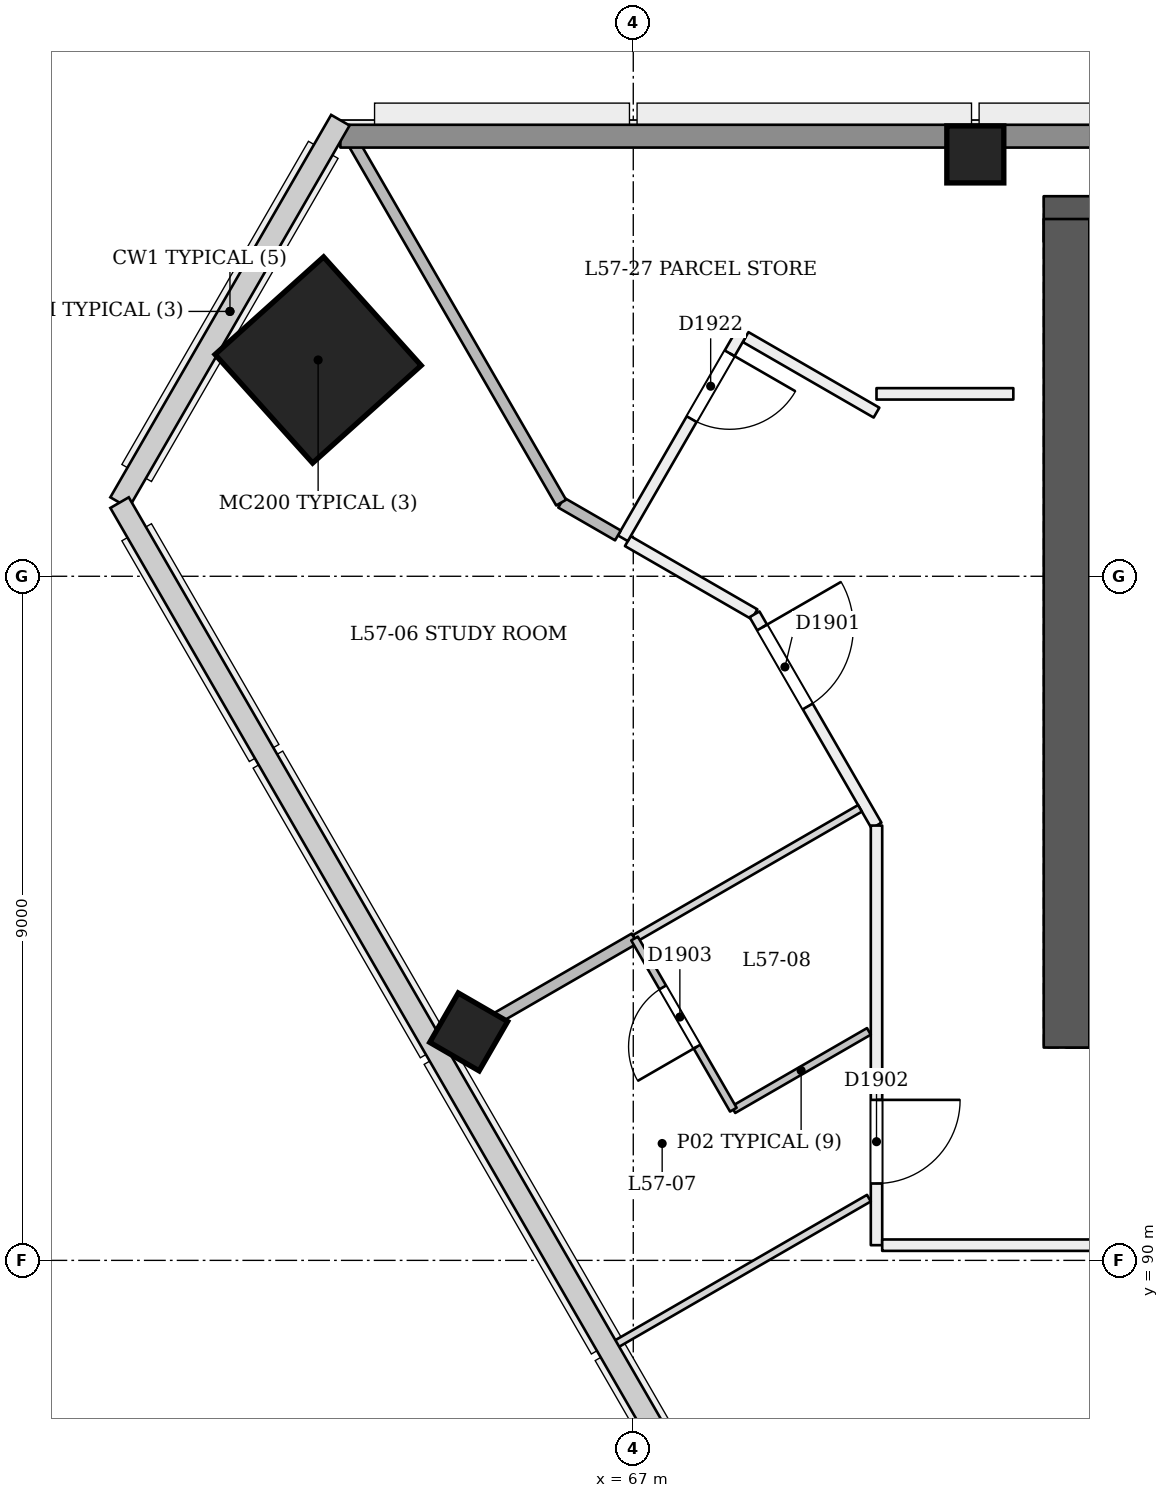
"""IFC4 building model, lengths in metres.
Left out: names, types, materials, properties, quantities, classifications, styles, units other than length and angle.
Written with IfcOpenShell. Run it as: python <this file> out.ifc"""

import sys

from ifc_helpers import new_model, si_unit, direction, frame, frame_2d, origin, origin_2d, place, context, subcontext, project, spatial, rectangle, extrude, element, fill, save


model = new_model("IFC4")
c1 = context("Model", 3, precision=1e-05, world=origin(), true_north=direction((0.0, 1.0)))
c2 = subcontext(c1, "Body", "Model", "MODEL_VIEW")
j1 = project(units=[si_unit("LENGTHUNIT", "METRE"), si_unit("PLANEANGLEUNIT", "RADIAN")], contexts=[c1])
p1 = place(None, origin())
s1 = spatial("IfcSite", under=j1, at=p1, CompositionType="ELEMENT")
p2 = place(p1, origin())
s2 = spatial("IfcBuilding", under=s1, at=p2, CompositionType="ELEMENT")
p3 = place(p2, frame((0.0, 0.0, 223.0)))
s3 = spatial("IfcBuildingStorey", under=s2, at=p3, CompositionType="ELEMENT", Elevation=223.0)
p4 = place(p3, frame((72.7, 93.1, 0.0), z_axis=(0.0, 0.0, 1.0), x_axis=(1.0, 0.0, 0.0)))
e1 = element("IfcWall", 1, at=p4, inside=s3, PredefinedType="SHEAR", context=c2, shape_type="SweptSolid", body=[
    extrude(rectangle(XDim=24.9, YDim=0.6, at=frame_2d((12.45, 0.0))), origin(), (0.0, 0.0, 1.0), 3.6),
])
p5 = place(p4, frame((1.1, 0.0, 0.0)))
e2 = element("IfcOpeningElement", 2, at=p5, cuts=e1, PredefinedType="OPENING", context=c2, shape_type="SweptSolid", body=[
    extrude(rectangle(XDim=1.2, YDim=2.1, at=frame_2d((0.6, 1.05))), frame((0.0, 0.311, 0.0), z_axis=(0.0, -1.0, 0.0), x_axis=(1.0, 0.0, 0.0)), (0.0, 0.0, 1.0), 0.621),
])
p6 = place(p4, frame((3.3, 0.0, 0.0)))
e3 = element("IfcOpeningElement", 3, at=p6, cuts=e1, PredefinedType="OPENING", context=c2, shape_type="SweptSolid", body=[
    extrude(rectangle(XDim=1.2, YDim=2.1, at=frame_2d((0.6, 1.05))), frame((0.0, 0.311, 0.0), z_axis=(0.0, -1.0, 0.0), x_axis=(1.0, 0.0, 0.0)), (0.0, 0.0, 1.0), 0.621),
])
p7 = place(p4, frame((13.3, 0.0, 0.0)))
e4 = element("IfcOpeningElement", 4, at=p7, cuts=e1, PredefinedType="OPENING", context=c2, shape_type="SweptSolid", body=[
    extrude(rectangle(XDim=1.2, YDim=2.1, at=frame_2d((0.6, 1.05))), frame((0.0, 0.311, 0.0), z_axis=(0.0, -1.0, 0.0), x_axis=(1.0, 0.0, 0.0)), (0.0, 0.0, 1.0), 0.621),
])
p8 = place(p4, frame((15.762, 0.0, 0.0)))
e5 = element("IfcOpeningElement", 5, at=p8, cuts=e1, PredefinedType="OPENING", context=c2, shape_type="SweptSolid", body=[
    extrude(rectangle(XDim=1.0, YDim=2.1, at=frame_2d((0.5, 1.05))), frame((0.0, 0.311, 0.0), z_axis=(0.0, -1.0, 0.0), x_axis=(1.0, 0.0, 0.0)), (0.0, 0.0, 1.0), 0.621),
])
p9 = place(p4, frame((18.2, 0.0, 0.0)))
e6 = element("IfcOpeningElement", 6, at=p9, cuts=e1, PredefinedType="OPENING", context=c2, shape_type="SweptSolid", body=[
    extrude(rectangle(XDim=1.0, YDim=2.1, at=frame_2d((0.5, 1.05))), frame((0.0, 0.311, 0.0), z_axis=(0.0, -1.0, 0.0), x_axis=(1.0, 0.0, 0.0)), (0.0, 0.0, 1.0), 0.621),
])
p10 = place(p4, frame((20.55, 0.0, 0.0)))
e7 = element("IfcOpeningElement", 7, at=p10, cuts=e1, PredefinedType="OPENING", context=c2, shape_type="SweptSolid", body=[
    extrude(rectangle(XDim=1.0, YDim=2.1, at=frame_2d((0.5, 1.05))), frame((0.0, 0.311, 0.0), z_axis=(0.0, -1.0, 0.0), x_axis=(1.0, 0.0, 0.0)), (0.0, 0.0, 1.0), 0.621),
])
p11 = place(p4, frame((22.837, 0.0, 0.0)))
e8 = element("IfcOpeningElement", 8, at=p11, cuts=e1, PredefinedType="OPENING", context=c2, shape_type="SweptSolid", body=[
    extrude(rectangle(XDim=1.0, YDim=2.1, at=frame_2d((0.5, 1.05))), frame((0.0, 0.311, 0.0), z_axis=(0.0, -1.0, 0.0), x_axis=(1.0, 0.0, 0.0)), (0.0, 0.0, 1.0), 0.621),
])
p12 = place(p3, frame((97.3, 103.7, 0.0), z_axis=(0.0, 0.0, 1.0), x_axis=(-1.0, 0.0, 0.0)))
e9 = element("IfcWall", 9, at=p12, inside=s3, PredefinedType="SHEAR", context=c2, shape_type="SweptSolid", body=[
    extrude(rectangle(XDim=24.9, YDim=0.6, at=frame_2d((12.45, 0.0))), origin(), (0.0, 0.0, 1.0), 3.6),
])
p13 = place(p3, frame((72.7, 103.7, 0.0), z_axis=(0.0, 0.0, 1.0), x_axis=(0.0, -1.0, 0.0)))
e10 = element("IfcWall", 10, at=p13, inside=s3, PredefinedType="SHEAR", context=c2, shape_type="SweptSolid", body=[
    extrude(rectangle(XDim=10.9, YDim=0.6, at=frame_2d((5.45, 0.0))), origin(), (0.0, 0.0, 1.0), 3.6),
])
p14 = place(p3, frame((62.82, 101.834, 0.0), z_axis=(0.028401814599, 0.009218727412, 0.999554076572), x_axis=(-0.865124501984, 0.501159851198, 0.019959950262)))
e11 = element("IfcColumn", 11, at=p14, inside=s3, PredefinedType="COLUMN", context=c2, shape_type="SweptSolid", body=[
    extrude(rectangle(XDim=1.92, YDim=1.92, at=origin_2d()), origin(), (0.0, 0.0, 1.0), 3.602),
])
p15 = place(p3, frame((71.5, 104.55, 0.0), z_axis=(0.0, 0.0, 1.0), x_axis=(1.0, 0.0, 0.0)))
e12 = element("IfcColumn", 12, at=p15, inside=s3, PredefinedType="COLUMN", context=c2, shape_type="SweptSolid", body=[
    extrude(rectangle(XDim=0.75, YDim=0.75, at=origin_2d()), origin(), (0.0, 0.0, 1.0), 3.6),
])
p16 = place(p3, frame((64.808, 92.958, -0.023), z_axis=(0.022222852987, 0.038483477124, 0.999012095419), x_axis=(-0.865640504424, -0.499184727526, 0.038485385601)))
e13 = element("IfcColumn", 13, at=p16, inside=s3, PredefinedType="COLUMN", context=c2, shape_type="SweptSolid", body=[
    extrude(rectangle(XDim=0.75, YDim=0.75, at=origin_2d()), origin(), (0.0, 0.0, 1.0), 3.604),
])
p17 = place(p3, frame((66.928, 99.462, 0.0), z_axis=(0.0, 0.0, 1.0), x_axis=(0.866033512162, -0.499985955615, 0.0)))
e14 = element("IfcWall", 14, at=p17, inside=s3, PredefinedType="PARTITIONING", context=c2, shape_type="SweptSolid", body=[
    extrude(rectangle(XDim=1.925, YDim=0.15, at=frame_2d((0.962, 0.0))), origin(), (0.0, 0.0, 1.0), 3.2),
])
p18 = place(p3, frame((68.595, 98.5, 0.0), z_axis=(0.0, 0.0, 1.0), x_axis=(0.499992422807, -0.866029778435, 0.0)))
e15 = element("IfcWall", 15, at=p18, inside=s3, PredefinedType="PARTITIONING", context=c2, shape_type="SweptSolid", body=[
    extrude(rectangle(XDim=3.209, YDim=0.15, at=frame_2d((1.605, 0.0))), origin(), (0.0, 0.0, 1.0), 3.2),
])
p19 = place(p18, frame((0.2, 0.0, 0.0)))
e16 = element("IfcOpeningElement", 16, at=p19, cuts=e15, PredefinedType="OPENING", context=c2, shape_type="SweptSolid", body=[
    extrude(rectangle(XDim=1.2, YDim=2.1, at=frame_2d((0.6, 1.05))), frame((0.0, 0.085, 0.0), z_axis=(0.0, -1.0, 0.0), x_axis=(1.0, 0.0, 0.0)), (0.0, 0.0, 1.0), 0.171),
])
p20 = place(p3, frame((70.2, 95.72, 0.0), z_axis=(0.0, 0.0, 1.0), x_axis=(0.0, -1.0, 0.0)))
e17 = element("IfcWall", 17, at=p20, inside=s3, PredefinedType="PARTITIONING", context=c2, shape_type="SweptSolid", body=[
    extrude(rectangle(XDim=5.521, YDim=0.15, at=frame_2d((2.76, 0.0))), origin(), (0.0, 0.0, 1.0), 3.2),
])
p21 = place(p20, frame((3.609, 0.0, 0.0)))
e18 = element("IfcOpeningElement", 18, at=p21, cuts=e17, PredefinedType="OPENING", context=c2, shape_type="SweptSolid", body=[
    extrude(rectangle(XDim=1.1, YDim=2.1, at=frame_2d((0.55, 1.05))), frame((0.0, 0.085, 0.0), z_axis=(0.0, -1.0, 0.0), x_axis=(1.0, 0.0, 0.0)), (0.0, 0.0, 1.0), 0.171),
])
p22 = place(p3, frame((70.275, 90.2, 0.0), z_axis=(0.0, 0.0, 1.0), x_axis=(1.0, 0.0, 0.0)))
e19 = element("IfcWall", 19, at=p22, inside=s3, PredefinedType="PARTITIONING", context=c2, shape_type="SweptSolid", body=[
    extrude(rectangle(XDim=3.112, YDim=0.15, at=frame_2d((1.556, 0.0))), origin(), (0.0, 0.0, 1.0), 3.2),
])
p23 = place(p3, frame((72.0, 101.4, 0.0), z_axis=(0.0, 0.0, 1.0), x_axis=(-1.0, 0.0, 0.0)))
e20 = element("IfcWall", 20, at=p23, inside=s3, PredefinedType="PARTITIONING", context=c2, shape_type="SweptSolid", body=[
    extrude(rectangle(XDim=1.8, YDim=0.15, at=frame_2d((0.9, 0.0))), origin(), (0.0, 0.0, 1.0), 3.2),
])
p24 = place(p3, frame((70.2, 101.153, 0.0), z_axis=(0.0, 0.0, 1.0), x_axis=(-0.865997437773, 0.500048435424, 0.0)))
e21 = element("IfcWall", 21, at=p24, inside=s3, PredefinedType="PARTITIONING", context=c2, shape_type="SweptSolid", body=[
    extrude(rectangle(XDim=1.988, YDim=0.15, at=frame_2d((0.994, 0.0))), origin(), (0.0, 0.0, 1.0), 3.2),
])
p25 = place(p3, frame((68.413, 102.185, 0.0), z_axis=(0.0, 0.0, 1.0), x_axis=(-0.499967891604, -0.866043940782, 0.0)))
e22 = element("IfcWall", 22, at=p25, inside=s3, PredefinedType="PARTITIONING", context=c2, shape_type="SweptSolid", body=[
    extrude(rectangle(XDim=3.1, YDim=0.15, at=frame_2d((1.55, 0.0))), origin(), (0.0, 0.0, 1.0), 3.2),
])
p26 = place(p25, frame((0.29, 0.0, 0.0)))
e23 = element("IfcOpeningElement", 23, at=p26, cuts=e22, PredefinedType="OPENING", context=c2, shape_type="SweptSolid", body=[
    extrude(rectangle(XDim=1.0, YDim=2.1, at=frame_2d((0.5, 1.05))), frame((0.0, 0.085, 0.0), z_axis=(0.0, -1.0, 0.0), x_axis=(1.0, 0.0, 0.0)), (0.0, 0.0, 1.0), 0.171),
])
p27 = place(p3, frame((64.505, 92.784, 0.0), z_axis=(0.0, 0.0, 1.0), x_axis=(0.866032775405, 0.499987231761, 0.0)))
e24 = element("IfcWall", 24, at=p27, inside=s3, PredefinedType="PARTITIONING", context=c2, shape_type="SweptSolid", body=[
    extrude(rectangle(XDim=2.9, YDim=0.15, at=frame_2d((1.45, 0.0))), origin(), (0.0, 0.0, 1.0), 2.7),
])
p28 = place(p3, frame((67.017, 94.234, 0.0), z_axis=(0.0, 0.0, 1.0), x_axis=(0.866001587311, 0.500041249073, 0.0)))
e25 = element("IfcWall", 25, at=p28, inside=s3, PredefinedType="PARTITIONING", context=c2, shape_type="SweptSolid", body=[
    extrude(rectangle(XDim=3.425, YDim=0.1, at=frame_2d((1.712, 0.0))), origin(), (0.0, 0.0, 1.0), 3.2),
])
p29 = place(p3, frame((66.798, 99.538, 0.0), z_axis=(0.0, 0.0, 1.0), x_axis=(-0.866058379388, 0.499942880228, 0.0)))
e26 = element("IfcWall", 26, at=p29, inside=s3, PredefinedType="PARTITIONING", context=c2, shape_type="SweptSolid", body=[
    extrude(rectangle(XDim=0.863, YDim=0.15, at=frame_2d((0.431, 0.0))), origin(), (0.0, 0.0, 1.0), 3.2),
])
p30 = place(p3, frame((66.051, 99.969, 0.0), z_axis=(0.0, 0.0, 1.0), x_axis=(-0.500008252402, 0.866020639205, 0.0)))
e27 = element("IfcWall", 27, at=p30, inside=s3, PredefinedType="PARTITIONING", context=c2, shape_type="SweptSolid", body=[
    extrude(rectangle(XDim=5.694, YDim=0.15, at=frame_2d((2.847, 0.0))), origin(), (0.0, 0.0, 1.0), 2.7),
])
p31 = place(p3, frame((70.1, 93.012, 0.0), z_axis=(0.0, 0.0, 1.0), x_axis=(-0.866001980287, -0.500040568494, 0.0)))
e28 = element("IfcWall", 28, at=p31, inside=s3, PredefinedType="PARTITIONING", context=c2, shape_type="SweptSolid", body=[
    extrude(rectangle(XDim=2.059, YDim=0.1, at=frame_2d((1.03, 0.0))), origin(), (0.0, 0.0, 1.0), 3.2),
])
p32 = place(p3, frame((68.317, 91.983, 0.0), z_axis=(0.0, 0.0, 1.0), x_axis=(-0.500006934395, 0.866021400173, 0.0)))
e29 = element("IfcWall", 29, at=p32, inside=s3, PredefinedType="PARTITIONING", context=c2, shape_type="SweptSolid", body=[
    extrude(rectangle(XDim=2.6, YDim=0.1, at=frame_2d((1.3, 0.0))), origin(), (0.0, 0.0, 1.0), 3.2),
])
p33 = place(p32, frame((0.957, 0.0, 0.0)))
e30 = element("IfcOpeningElement", 30, at=p33, cuts=e29, PredefinedType="OPENING", context=c2, shape_type="SweptSolid", body=[
    extrude(rectangle(XDim=0.9, YDim=2.1, at=frame_2d((0.45, 1.05))), frame((0.0, 0.061, 0.0), z_axis=(0.0, -1.0, 0.0), x_axis=(1.0, 0.0, 0.0)), (0.0, 0.0, 1.0), 0.121),
])
p34 = place(p3, frame((66.738, 88.877, 0.0), z_axis=(0.0, 0.0, 1.0), x_axis=(0.866021190573, 0.500007297425, 0.0)))
e31 = element("IfcWall", 31, at=p34, inside=s3, PredefinedType="PARTITIONING", context=c2, shape_type="SweptSolid", body=[
    extrude(rectangle(XDim=3.883, YDim=0.1, at=frame_2d((1.941, 0.0))), origin(), (0.0, 0.0, 1.0), 2.7),
])
p35 = place(p3, frame((63.146, 104.79, 0.0), z_axis=(0.0, 0.0, 1.0), x_axis=(1.0, 0.0, 0.0)))
e32 = element("IfcWall", 32, at=p35, inside=s3, PredefinedType="SOLIDWALL", context=c2, shape_type="SweptSolid", body=[
    extrude(rectangle(XDim=43.708, YDim=0.3, at=frame_2d((21.854, 0.0))), origin(), (0.0, 0.0, 1.0), 2.7),
])
p36 = place(p19, origin())
e33 = element("IfcDoor", 33, at=p36, inside=s3, OperationType="SINGLE_SWING_LEFT", PredefinedType="NOTDEFINED", context=c2, shape_type="SweptSolid", body=[
    extrude(rectangle(XDim=1.2, YDim=2.1, at=frame_2d((0.6, 1.05))), frame((0.0, 0.025, 0.0), z_axis=(0.0, -1.0, 0.0), x_axis=(1.0, 0.0, 0.0)), (0.0, 0.0, 1.0), 0.05),
])
fill(e16, e33)
p37 = place(p21, origin())
e34 = element("IfcDoor", 34, at=p37, inside=s3, OperationType="SINGLE_SWING_LEFT", PredefinedType="NOTDEFINED", context=c2, shape_type="SweptSolid", body=[
    extrude(rectangle(XDim=1.1, YDim=2.1, at=frame_2d((0.55, 1.05))), frame((0.0, 0.025, 0.0), z_axis=(0.0, -1.0, 0.0), x_axis=(1.0, 0.0, 0.0)), (0.0, 0.0, 1.0), 0.05),
])
fill(e18, e34)
p38 = place(p33, origin())
e35 = element("IfcDoor", 35, at=p38, inside=s3, OperationType="SINGLE_SWING_LEFT", PredefinedType="NOTDEFINED", context=c2, shape_type="SweptSolid", body=[
    extrude(rectangle(XDim=0.9, YDim=2.1, at=frame_2d((0.45, 1.05))), frame((0.0, 0.025, 0.0), z_axis=(0.0, -1.0, 0.0), x_axis=(1.0, 0.0, 0.0)), (0.0, 0.0, 1.0), 0.05),
])
fill(e30, e35)
p39 = place(p26, origin())
e36 = element("IfcDoor", 36, at=p39, inside=s3, OperationType="SINGLE_SWING_LEFT", PredefinedType="NOTDEFINED", context=c2, shape_type="SweptSolid", body=[
    extrude(rectangle(XDim=1.0, YDim=2.1, at=frame_2d((0.5, 1.05))), frame((0.0, 0.025, 0.0), z_axis=(0.0, -1.0, 0.0), x_axis=(1.0, 0.0, 0.0)), (0.0, 0.0, 1.0), 0.05),
])
fill(e23, e36)
save(model, sys.argv[1])
